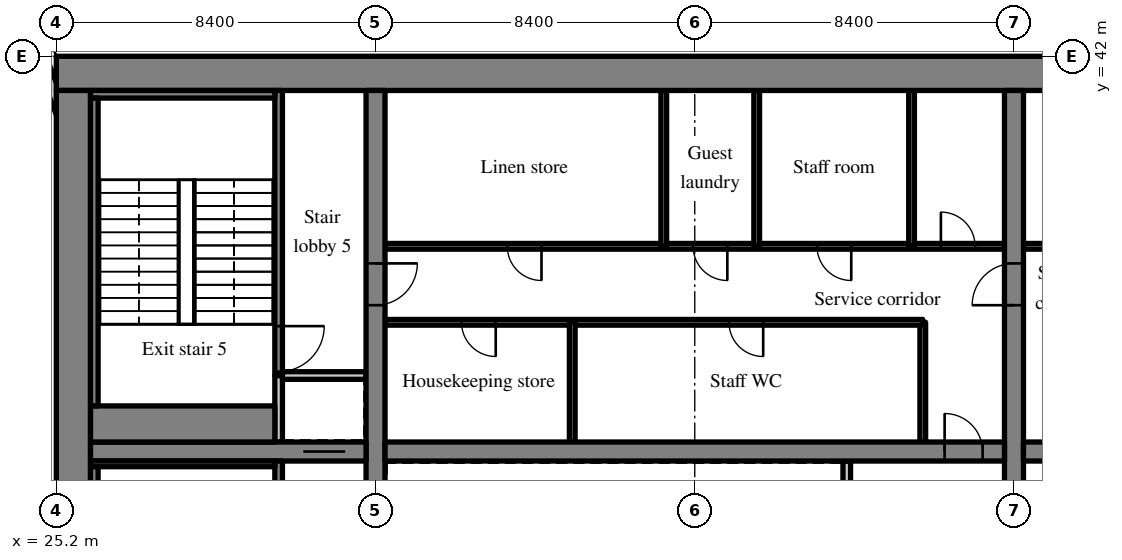
"""IFC4 building model, lengths in metres.
Left out: names, types, materials, properties, quantities, classifications, styles, units other than length and angle.
Written with IfcOpenShell. Run it as: python <this file> out.ifc"""

import sys

from ifc_helpers import new_model, si_unit, direction, frame, frame_2d, origin, place, context, subcontext, project, spatial, rectangle, extrude, source, transform, mapped, element, fill, save


model = new_model("IFC4")
c1 = context("Model", 3, precision=1e-05, world=origin(), true_north=direction((0.0, 1.0)))
c2 = subcontext(c1, "Body", "Model", "MODEL_VIEW")
j1 = project(units=[si_unit("LENGTHUNIT", "METRE"), si_unit("PLANEANGLEUNIT", "RADIAN")], contexts=[c1])
p1 = place(None, origin())
s1 = spatial("IfcSite", under=j1, at=p1, CompositionType="ELEMENT")
p2 = place(p1, origin())
s2 = spatial("IfcBuilding", under=s1, at=p2, CompositionType="ELEMENT")
p3 = place(p2, frame((0.0, 0.0, 137.0)))
s3 = spatial("IfcBuildingStorey", under=s2, at=p3, CompositionType="ELEMENT", Elevation=137.0)
m1 = source(origin(), c2, "Body", "SweptSolid", [
    extrude(rectangle(XDim=50.4, YDim=0.9, at=frame_2d((25.2, 0.0))), origin(), (0.0, 0.0, 1.0), 3.52),
])
p4 = place(p3, frame((25.2, 41.55, 0.0), z_axis=(0.0, 0.0, 1.0), x_axis=(1.0, 0.0, 0.0)))
e1 = element("IfcWall", 1, at=p4, inside=s3, PredefinedType="SHEAR", context=c2, shape_type="MappedRepresentation", body=[
    mapped(m1, transform((0.0, 0.0, 0.0), scale=1.0)),
])
m2 = source(origin(), c2, "Body", "SweptSolid", [
    extrude(rectangle(XDim=18.2, YDim=0.9, at=frame_2d((9.1, 0.0))), origin(), (0.0, 0.0, 1.0), 3.52),
])
p5 = place(p3, frame((25.65, 22.9, 0.0), z_axis=(0.0, 0.0, 1.0), x_axis=(0.0, 1.0, 0.0)))
e2 = element("IfcWall", 2, at=p5, inside=s3, PredefinedType="SHEAR", context=c2, shape_type="MappedRepresentation", body=[
    mapped(m2, transform((0.0, 0.0, 0.0), scale=1.0)),
])
m3 = source(origin(), c2, "Body", "SweptSolid", [
    extrude(rectangle(XDim=18.2, YDim=0.5, at=frame_2d((9.1, 0.0))), origin(), (0.0, 0.0, 1.0), 3.52),
])
p6 = place(p3, frame((33.6, 22.9, 0.0), z_axis=(0.0, 0.0, 1.0), x_axis=(0.0, 1.0, 0.0)))
e3 = element("IfcWall", 3, at=p6, inside=s3, PredefinedType="SHEAR", context=c2, shape_type="MappedRepresentation", body=[
    mapped(m3, transform((0.0, 0.0, 0.0), scale=1.0)),
])
m4 = source(origin(), c2, "Body", "SweptSolid", [
    extrude(rectangle(XDim=1.1, YDim=2.1, at=frame_2d((0.55, 1.05))), frame((0.0, 0.26, 0.0), z_axis=(0.0, -1.0, 0.0), x_axis=(1.0, 0.0, 0.0)), (0.0, 0.0, 1.0), 0.52),
])
p7 = place(p6, frame((12.55, 0.0, 0.0)))
e4 = element("IfcOpeningElement", 4, at=p7, cuts=e3, PredefinedType="OPENING", context=c2, shape_type="MappedRepresentation", body=[
    mapped(m4, transform((0.0, 0.0, 0.0), scale=1.0)),
])
p8 = place(p3, frame((50.4, 22.9, 0.0), z_axis=(0.0, 0.0, 1.0), x_axis=(0.0, 1.0, 0.0)))
e5 = element("IfcWall", 5, at=p8, inside=s3, PredefinedType="SHEAR", context=c2, shape_type="MappedRepresentation", body=[
    mapped(m3, transform((0.0, 0.0, 0.0), scale=1.0)),
])
p9 = place(p8, frame((12.55, 0.0, 0.0)))
e6 = element("IfcOpeningElement", 6, at=p9, cuts=e5, PredefinedType="OPENING", context=c2, shape_type="MappedRepresentation", body=[
    mapped(m4, transform((0.0, 0.0, 0.0), scale=1.0)),
])
m5 = source(origin(), c2, "Body", "SweptSolid", [
    extrude(rectangle(XDim=7.25, YDim=0.5, at=frame_2d((3.625, 0.0))), origin(), (0.0, 0.0, 1.0), 3.52),
])
p10 = place(p3, frame((26.1, 31.6, 0.0), z_axis=(0.0, 0.0, 1.0), x_axis=(1.0, 0.0, 0.0)))
e7 = element("IfcWall", 7, at=p10, inside=s3, PredefinedType="SHEAR", context=c2, shape_type="MappedRepresentation", body=[
    mapped(m5, transform((0.0, 0.0, 0.0), scale=1.0)),
])
p11 = place(p10, frame((5.6, 0.0, 0.0)))
e8 = element("IfcOpeningElement", 8, at=p11, cuts=e7, PredefinedType="OPENING", context=c2, shape_type="MappedRepresentation", body=[
    mapped(m4, transform((0.0, 0.0, 0.0), scale=1.0)),
])
m6 = source(origin(), c2, "Body", "SweptSolid", [
    extrude(rectangle(XDim=16.3, YDim=0.5, at=frame_2d((8.15, 0.0))), origin(), (0.0, 0.0, 1.0), 3.52),
])
p12 = place(p3, frame((33.85, 31.6, 0.0), z_axis=(0.0, 0.0, 1.0), x_axis=(1.0, 0.0, 0.0)))
e9 = element("IfcWall", 9, at=p12, inside=s3, PredefinedType="SHEAR", context=c2, shape_type="MappedRepresentation", body=[
    mapped(m6, transform((0.0, 0.0, 0.0), scale=1.0)),
])
m7 = source(origin(), c2, "Body", "SweptSolid", [
    extrude(rectangle(XDim=1.0, YDim=2.1, at=frame_2d((0.5, 1.05))), frame((0.0, 0.26, 0.0), z_axis=(0.0, -1.0, 0.0), x_axis=(1.0, 0.0, 0.0)), (0.0, 0.0, 1.0), 0.52),
])
p13 = place(p12, frame((14.725, 0.0, 0.0)))
e10 = element("IfcOpeningElement", 10, at=p13, cuts=e9, PredefinedType="OPENING", context=c2, shape_type="MappedRepresentation", body=[
    mapped(m7, transform((0.0, 0.0, 0.0), scale=1.0)),
])
m8 = source(origin(), c2, "Body", "SweptSolid", [
    extrude(rectangle(XDim=16.3, YDim=0.5, at=frame_2d((8.15, 0.0))), origin(), (0.0, 0.0, 1.0), 3.52),
])
p14 = place(p3, frame((50.65, 31.6, 0.0), z_axis=(0.0, 0.0, 1.0), x_axis=(1.0, 0.0, 0.0)))
e11 = element("IfcWall", 11, at=p14, inside=s3, PredefinedType="SHEAR", context=c2, shape_type="MappedRepresentation", body=[
    mapped(m8, transform((0.0, 0.0, 0.0), scale=1.0)),
])
p15 = place(p14, frame((0.575, 0.0, 0.0)))
e12 = element("IfcOpeningElement", 12, at=p15, cuts=e11, PredefinedType="OPENING", context=c2, shape_type="MappedRepresentation", body=[
    mapped(m7, transform((0.0, 0.0, 0.0), scale=1.0)),
])
m9 = source(origin(), c2, "Body", "SweptSolid", [
    extrude(rectangle(XDim=3.559, YDim=0.3, at=frame_2d((1.78, 0.0))), origin(), (0.0, 0.0, 1.0), 3.52),
])
p16 = place(p3, frame((25.55, 39.969, 0.0), z_axis=(0.0, 0.0, 1.0), x_axis=(-0.35779745313, 0.933799219604, 0.0)))
e13 = element("IfcWall", 13, at=p16, inside=s3, PredefinedType="SOLIDWALL", context=c2, shape_type="MappedRepresentation", body=[
    mapped(m9, transform((0.0, 0.0, 0.0), scale=1.0)),
])
m10 = source(origin(), c2, "Body", "SweptSolid", [
    extrude(rectangle(XDim=1.5, YDim=2.0, at=frame_2d((0.75, 1.0))), frame((0.0, 0.16, 0.0), z_axis=(0.0, -1.0, 0.0), x_axis=(1.0, 0.0, 0.0)), (0.0, 0.0, 1.0), 0.32),
])
p17 = place(p16, frame((1.903, 0.0, 0.9)))
e14 = element("IfcOpeningElement", 14, at=p17, cuts=e13, PredefinedType="OPENING", context=c2, shape_type="MappedRepresentation", body=[
    mapped(m10, transform((0.0, 0.0, 0.0), scale=1.0)),
])
m11 = source(origin(), c2, "Body", "SweptSolid", [
    extrude(rectangle(XDim=2.55, YDim=0.2, at=frame_2d((1.275, 0.0))), origin(), (0.0, 0.0, 1.0), 3.52),
])
p18 = place(p3, frame((46.0, 28.8, 0.0), z_axis=(0.0, 0.0, 1.0), x_axis=(0.0, 1.0, 0.0)))
e15 = element("IfcWall", 15, at=p18, inside=s3, PredefinedType="SOLIDWALL", context=c2, shape_type="MappedRepresentation", body=[
    mapped(m11, transform((0.0, 0.0, 0.0), scale=1.0)),
])
m12 = source(origin(), c2, "Body", "SweptSolid", [
    extrude(rectangle(XDim=3.15, YDim=0.15, at=frame_2d((1.575, 0.0))), origin(), (0.0, 0.0, 1.0), 3.52),
])
p19 = place(p3, frame((48.0, 31.85, 0.0), z_axis=(0.0, 0.0, 1.0), x_axis=(0.0, 1.0, 0.0)))
e16 = element("IfcWall", 16, at=p19, inside=s3, PredefinedType="PARTITIONING", context=c2, shape_type="MappedRepresentation", body=[
    mapped(m12, transform((0.0, 0.0, 0.0), scale=1.0)),
])
m13 = source(origin(), c2, "Body", "SweptSolid", [
    extrude(rectangle(XDim=14.15, YDim=0.15, at=frame_2d((7.075, 0.0))), origin(), (0.0, 0.0, 1.0), 3.52),
])
p20 = place(p3, frame((33.85, 35.0, 0.0), z_axis=(0.0, 0.0, 1.0), x_axis=(1.0, 0.0, 0.0)))
e17 = element("IfcWall", 17, at=p20, inside=s3, PredefinedType="PARTITIONING", context=c2, shape_type="MappedRepresentation", body=[
    mapped(m13, transform((0.0, 0.0, 0.0), scale=1.0)),
])
m14 = source(origin(), c2, "Body", "SweptSolid", [
    extrude(rectangle(XDim=0.9, YDim=2.1, at=frame_2d((0.45, 1.05))), frame((0.0, 0.085, 0.0), z_axis=(0.0, -1.0, 0.0), x_axis=(1.0, 0.0, 0.0)), (0.0, 0.0, 1.0), 0.17),
])
p21 = place(p20, frame((2.013, 0.0, 0.0)))
e18 = element("IfcOpeningElement", 18, at=p21, cuts=e17, PredefinedType="OPENING", context=c2, shape_type="MappedRepresentation", body=[
    mapped(m14, transform((0.0, 0.0, 0.0), scale=1.0)),
])
p22 = place(p20, frame((9.051, 0.0, 0.0)))
e19 = element("IfcOpeningElement", 19, at=p22, cuts=e17, PredefinedType="OPENING", context=c2, shape_type="MappedRepresentation", body=[
    mapped(m14, transform((0.0, 0.0, 0.0), scale=1.0)),
])
m15 = source(origin(), c2, "Body", "SweptSolid", [
    extrude(rectangle(XDim=16.3, YDim=0.15, at=frame_2d((8.15, 0.0))), origin(), (0.0, 0.0, 1.0), 3.52),
])
p23 = place(p3, frame((33.85, 37.0, 0.0), z_axis=(0.0, 0.0, 1.0), x_axis=(1.0, 0.0, 0.0)))
e20 = element("IfcWall", 20, at=p23, inside=s3, PredefinedType="PARTITIONING", context=c2, shape_type="MappedRepresentation", body=[
    mapped(m15, transform((0.0, 0.0, 0.0), scale=1.0)),
])
p24 = place(p23, frame((3.217, 0.0, 0.0)))
e21 = element("IfcOpeningElement", 21, at=p24, cuts=e20, PredefinedType="OPENING", context=c2, shape_type="MappedRepresentation", body=[
    mapped(m14, transform((0.0, 0.0, 0.0), scale=1.0)),
])
p25 = place(p23, frame((8.107, 0.0, 0.0)))
e22 = element("IfcOpeningElement", 22, at=p25, cuts=e20, PredefinedType="OPENING", context=c2, shape_type="MappedRepresentation", body=[
    mapped(m14, transform((0.0, 0.0, 0.0), scale=1.0)),
])
p26 = place(p23, frame((11.368, 0.0, 0.0)))
e23 = element("IfcOpeningElement", 23, at=p26, cuts=e20, PredefinedType="OPENING", context=c2, shape_type="MappedRepresentation", body=[
    mapped(m14, transform((0.0, 0.0, 0.0), scale=1.0)),
])
p27 = place(p23, frame((14.627, 0.0, 0.0)))
e24 = element("IfcOpeningElement", 24, at=p27, cuts=e20, PredefinedType="OPENING", context=c2, shape_type="MappedRepresentation", body=[
    mapped(m14, transform((0.0, 0.0, 0.0), scale=1.0)),
])
p28 = place(p3, frame((38.776, 31.85, 0.0), z_axis=(0.0, 0.0, 1.0), x_axis=(0.0, 1.0, 0.0)))
e25 = element("IfcWall", 25, at=p28, inside=s3, PredefinedType="PARTITIONING", context=c2, shape_type="MappedRepresentation", body=[
    mapped(m12, transform((0.0, 0.0, 0.0), scale=1.0)),
])
m16 = source(origin(), c2, "Body", "SweptSolid", [
    extrude(rectangle(XDim=4.1, YDim=0.15, at=frame_2d((2.05, 0.0))), origin(), (0.0, 0.0, 1.0), 3.52),
])
for number, where, z_axis, x_axis in (
    (26, (41.185, 37.0, 0.0), (0.0, 0.0, 1.0), (0.0, 1.0, 0.0)),
    (27, (43.63, 37.0, 0.0), (0.0, 0.0, 1.0), (0.0, 1.0, 0.0)),
    (28, (47.705, 37.0, 0.0), (0.0, 0.0, 1.0), (0.0, 1.0, 0.0)),
):
    element("IfcWall", number, at=place(p3, frame(where, z_axis=z_axis, x_axis=x_axis)), inside=s3, PredefinedType="PARTITIONING", context=c2, shape_type="MappedRepresentation", body=[
        mapped(m16, transform((0.0, 0.0, 0.0), scale=1.0)),
    ])
m17 = source(origin(), c2, "Body", "SweptSolid", [
    extrude(rectangle(XDim=16.3, YDim=0.15, at=frame_2d((8.15, 0.0))), origin(), (0.0, 0.0, 1.0), 3.52),
])
p29 = place(p3, frame((66.95, 37.0, 0.0), z_axis=(0.0, 0.0, 1.0), x_axis=(-1.0, 0.0, 0.0)))
e29 = element("IfcWall", 29, at=p29, inside=s3, PredefinedType="PARTITIONING", context=c2, shape_type="MappedRepresentation", body=[
    mapped(m17, transform((0.0, 0.0, 0.0), scale=1.0)),
])
p30 = place(p29, frame((0.773, 0.0, 0.0)))
e30 = element("IfcOpeningElement", 30, at=p30, cuts=e29, PredefinedType="OPENING", context=c2, shape_type="MappedRepresentation", body=[
    mapped(m14, transform((0.0, 0.0, 0.0), scale=1.0)),
])
p31 = place(p29, frame((3.625, 0.0, 0.0)))
e31 = element("IfcOpeningElement", 31, at=p31, cuts=e29, PredefinedType="OPENING", context=c2, shape_type="MappedRepresentation", body=[
    mapped(m14, transform((0.0, 0.0, 0.0), scale=1.0)),
])
p32 = place(p29, frame((9.33, 0.0, 0.0)))
e32 = element("IfcOpeningElement", 32, at=p32, cuts=e29, PredefinedType="OPENING", context=c2, shape_type="MappedRepresentation", body=[
    mapped(m14, transform((0.0, 0.0, 0.0), scale=1.0)),
])
p33 = place(p29, frame((14.627, 0.0, 0.0)))
e33 = element("IfcOpeningElement", 33, at=p33, cuts=e29, PredefinedType="OPENING", context=c2, shape_type="MappedRepresentation", body=[
    mapped(m14, transform((0.0, 0.0, 0.0), scale=1.0)),
])
m18 = source(origin(), c2, "Body", "SweptSolid", [
    extrude(rectangle(XDim=8.45, YDim=0.2, at=frame_2d((4.225, 0.0))), origin(), (0.0, 0.0, 1.0), 3.52),
])
p34 = place(p3, frame((31.05, 22.9, 0.0), z_axis=(0.0, 0.0, 1.0), x_axis=(0.0, 1.0, 0.0)))
e34 = element("IfcWall", 34, at=p34, inside=s3, PredefinedType="SOLIDWALL", context=c2, shape_type="MappedRepresentation", body=[
    mapped(m18, transform((0.0, 0.0, 0.0), scale=1.0)),
])
m19 = source(origin(), c2, "Body", "SweptSolid", [
    extrude(rectangle(XDim=1.2, YDim=2.1, at=frame_2d((0.6, 1.05))), frame((0.0, 0.11, 0.0), z_axis=(0.0, -1.0, 0.0), x_axis=(1.0, 0.0, 0.0)), (0.0, 0.0, 1.0), 0.22),
])
p35 = place(p34, frame((0.7, 0.0, 0.0)))
e35 = element("IfcOpeningElement", 35, at=p35, cuts=e34, PredefinedType="OPENING", context=c2, shape_type="MappedRepresentation", body=[
    mapped(m19, transform((0.0, 0.0, 0.0), scale=1.0)),
])
m20 = source(origin(), c2, "Body", "SweptSolid", [
    extrude(rectangle(XDim=1.75, YDim=0.2, at=frame_2d((0.875, 0.0))), origin(), (0.0, 0.0, 1.0), 3.52),
])
p36 = place(p3, frame((31.05, 31.85, 0.0), z_axis=(0.0, 0.0, 1.0), x_axis=(0.0, 1.0, 0.0)))
e36 = element("IfcWall", 36, at=p36, inside=s3, PredefinedType="SOLIDWALL", context=c2, shape_type="MappedRepresentation", body=[
    mapped(m20, transform((0.0, 0.0, 0.0), scale=1.0)),
])
m21 = source(origin(), c2, "Body", "SweptSolid", [
    extrude(rectangle(XDim=2.2, YDim=0.2, at=frame_2d((1.1, 0.0))), origin(), (0.0, 0.0, 1.0), 3.52),
])
p37 = place(p3, frame((31.15, 33.6, 0.0), z_axis=(0.0, 0.0, 1.0), x_axis=(1.0, 0.0, 0.0)))
e37 = element("IfcWall", 37, at=p37, inside=s3, PredefinedType="SOLIDWALL", context=c2, shape_type="MappedRepresentation", body=[
    mapped(m21, transform((0.0, 0.0, 0.0), scale=1.0)),
])
m22 = source(origin(), c2, "Body", "SweptSolid", [
    extrude(rectangle(XDim=7.5, YDim=0.2, at=frame_2d((3.75, 0.0))), origin(), (0.0, 0.0, 1.0), 3.52),
])
p38 = place(p3, frame((31.05, 33.6, 0.0), z_axis=(0.0, 0.0, 1.0), x_axis=(0.0, 1.0, 0.0)))
e38 = element("IfcWall", 38, at=p38, inside=s3, PredefinedType="SOLIDWALL", context=c2, shape_type="MappedRepresentation", body=[
    mapped(m22, transform((0.0, 0.0, 0.0), scale=1.0)),
])
p39 = place(p38, frame((0.1, 0.0, 0.0)))
e39 = element("IfcOpeningElement", 39, at=p39, cuts=e38, PredefinedType="OPENING", context=c2, shape_type="MappedRepresentation", body=[
    mapped(m19, transform((0.0, 0.0, 0.0), scale=1.0)),
])
m23 = source(origin(), c2, "Body", "SweptSolid", [
    extrude(rectangle(XDim=4.85, YDim=0.15, at=frame_2d((2.425, 0.0))), origin(), (0.0, 0.0, 1.0), 3.52),
])
p40 = place(p3, frame((26.1, 31.275, 0.0), z_axis=(0.0, 0.0, 1.0), x_axis=(1.0, 0.0, 0.0)))
e40 = element("IfcWall", 40, at=p40, inside=s3, PredefinedType="SOLIDWALL", context=c2, shape_type="MappedRepresentation", body=[
    mapped(m23, transform((0.0, 0.0, 0.0), scale=1.0)),
])
m24 = source(origin(), c2, "Body", "SweptSolid", [
    extrude(rectangle(XDim=8.1, YDim=0.2, at=frame_2d((4.05, 0.0))), origin(), (0.0, 0.0, 1.0), 3.52),
])
p41 = place(p3, frame((26.2, 23.1, 0.0), z_axis=(0.0, 0.0, 1.0), x_axis=(0.0, 1.0, 0.0)))
e41 = element("IfcWall", 41, at=p41, inside=s3, PredefinedType="SOLIDWALL", context=c2, shape_type="MappedRepresentation", body=[
    mapped(m24, transform((0.0, 0.0, 0.0), scale=1.0)),
])
m25 = source(origin(), c2, "Body", "SweptSolid", [
    extrude(rectangle(XDim=4.85, YDim=0.2, at=frame_2d((2.425, 0.0))), origin(), (0.0, 0.0, 1.0), 3.52),
])
p42 = place(p3, frame((26.1, 41.0, 0.0), z_axis=(0.0, 0.0, 1.0), x_axis=(1.0, 0.0, 0.0)))
e42 = element("IfcWall", 42, at=p42, inside=s3, PredefinedType="SOLIDWALL", context=c2, shape_type="MappedRepresentation", body=[
    mapped(m25, transform((0.0, 0.0, 0.0), scale=1.0)),
])
m26 = source(origin(), c2, "Body", "SweptSolid", [
    extrude(rectangle(XDim=4.85, YDim=0.95, at=frame_2d((2.425, 0.0))), origin(), (0.0, 0.0, 1.0), 3.52),
])
p43 = place(p3, frame((26.1, 32.325, 0.0), z_axis=(0.0, 0.0, 1.0), x_axis=(1.0, 0.0, 0.0)))
e43 = element("IfcWall", 43, at=p43, inside=s3, PredefinedType="SOLIDWALL", context=c2, shape_type="MappedRepresentation", body=[
    mapped(m26, transform((0.0, 0.0, 0.0), scale=1.0)),
])
p44 = place(p3, frame((26.2, 32.8, 0.0), z_axis=(0.0, 0.0, 1.0), x_axis=(0.0, 1.0, 0.0)))
e44 = element("IfcWall", 44, at=p44, inside=s3, PredefinedType="SOLIDWALL", context=c2, shape_type="MappedRepresentation", body=[
    mapped(m24, transform((0.0, 0.0, 0.0), scale=1.0)),
])
m27 = source(origin(), c2, "Body", "SweptSolid", [
    extrude(rectangle(XDim=1.0, YDim=2.1, at=frame_2d((0.5, 1.05))), frame((0.0, 0.025, 0.0), z_axis=(0.0, -1.0, 0.0), x_axis=(1.0, 0.0, 0.0)), (0.0, 0.0, 1.0), 0.05),
])
p45 = place(p13, origin())
e45 = element("IfcDoor", 45, at=p45, inside=s3, OperationType="SINGLE_SWING_LEFT", PredefinedType="DOOR", context=c2, shape_type="MappedRepresentation", body=[
    mapped(m27, transform((0.0, 0.0, 0.0), scale=1.0)),
])
fill(e10, e45)
m28 = source(origin(), c2, "Body", "SweptSolid", [
    extrude(rectangle(XDim=0.9, YDim=2.1, at=frame_2d((0.45, 1.05))), frame((0.0, 0.025, 0.0), z_axis=(0.0, -1.0, 0.0), x_axis=(1.0, 0.0, 0.0)), (0.0, 0.0, 1.0), 0.05),
])
p46 = place(p21, origin())
e46 = element("IfcDoor", 46, at=p46, inside=s3, OperationType="SINGLE_SWING_RIGHT", PredefinedType="DOOR", context=c2, shape_type="MappedRepresentation", body=[
    mapped(m28, transform((0.0, 0.0, 0.0), scale=1.0)),
])
fill(e18, e46)
p47 = place(p22, origin())
e47 = element("IfcDoor", 47, at=p47, inside=s3, OperationType="SINGLE_SWING_RIGHT", PredefinedType="DOOR", context=c2, shape_type="MappedRepresentation", body=[
    mapped(m28, transform((0.0, 0.0, 0.0), scale=1.0)),
])
fill(e19, e47)
p48 = place(p24, origin())
e48 = element("IfcDoor", 48, at=p48, inside=s3, OperationType="SINGLE_SWING_RIGHT", PredefinedType="DOOR", context=c2, shape_type="MappedRepresentation", body=[
    mapped(m28, transform((0.0, 0.0, 0.0), scale=1.0)),
])
fill(e21, e48)
p49 = place(p25, origin())
e49 = element("IfcDoor", 49, at=p49, inside=s3, OperationType="SINGLE_SWING_RIGHT", PredefinedType="DOOR", context=c2, shape_type="MappedRepresentation", body=[
    mapped(m28, transform((0.0, 0.0, 0.0), scale=1.0)),
])
fill(e22, e49)
p50 = place(p26, origin())
e50 = element("IfcDoor", 50, at=p50, inside=s3, OperationType="SINGLE_SWING_RIGHT", PredefinedType="DOOR", context=c2, shape_type="MappedRepresentation", body=[
    mapped(m28, transform((0.0, 0.0, 0.0), scale=1.0)),
])
fill(e23, e50)
p51 = place(p27, origin())
e51 = element("IfcDoor", 51, at=p51, inside=s3, OperationType="SINGLE_SWING_LEFT", PredefinedType="DOOR", context=c2, shape_type="MappedRepresentation", body=[
    mapped(m28, transform((0.0, 0.0, 0.0), scale=1.0)),
])
fill(e24, e51)
m29 = source(origin(), c2, "Body", "SweptSolid", [
    extrude(rectangle(XDim=1.1, YDim=2.1, at=frame_2d((0.55, 1.05))), frame((0.0, 0.025, 0.0), z_axis=(0.0, -1.0, 0.0), x_axis=(1.0, 0.0, 0.0)), (0.0, 0.0, 1.0), 0.05),
])
p52 = place(p11, origin())
e52 = element("IfcDoor", 52, at=p52, inside=s3, OperationType="SLIDING_TO_RIGHT", PredefinedType="DOOR", context=c2, shape_type="MappedRepresentation", body=[
    mapped(m29, transform((0.0, 0.0, 0.0), scale=1.0)),
])
fill(e8, e52)
m30 = source(origin(), c2, "Body", "SweptSolid", [
    extrude(rectangle(XDim=1.2, YDim=2.1, at=frame_2d((0.6, 1.05))), frame((0.0, 0.025, 0.0), z_axis=(0.0, -1.0, 0.0), x_axis=(1.0, 0.0, 0.0)), (0.0, 0.0, 1.0), 0.05),
])
p53 = place(p39, origin())
e53 = element("IfcDoor", 53, at=p53, inside=s3, OperationType="SINGLE_SWING_RIGHT", PredefinedType="DOOR", context=c2, shape_type="MappedRepresentation", body=[
    mapped(m30, transform((0.0, 0.0, 0.0), scale=1.0)),
])
fill(e39, e53)
p54 = place(p7, origin())
e54 = element("IfcDoor", 54, at=p54, inside=s3, OperationType="SINGLE_SWING_RIGHT", PredefinedType="DOOR", context=c2, shape_type="MappedRepresentation", body=[
    mapped(m29, transform((0.0, 0.0, 0.0), scale=1.0)),
])
fill(e4, e54)
p55 = place(p9, origin())
e55 = element("IfcDoor", 55, at=p55, inside=s3, OperationType="SINGLE_SWING_LEFT", PredefinedType="DOOR", context=c2, shape_type="MappedRepresentation", body=[
    mapped(m29, transform((0.0, 0.0, 0.0), scale=1.0)),
])
fill(e6, e55)
save(model, sys.argv[1])
